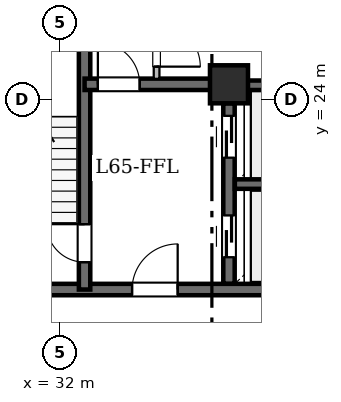
"""IFC4 building model, lengths in metres.
Left out: names, types, materials, properties, quantities, classifications, styles, units other than length and angle.
Written with IfcOpenShell. Run it as: python <this file> out.ifc"""

import sys

from ifc_helpers import new_model, si_unit, direction, frame, frame_2d, origin, origin_2d, place, context, subcontext, project, spatial, rectangle, hollow_rectangle, extrude, element, fill, save


model = new_model("IFC4")
c1 = context("Model", 3, precision=1e-05, world=origin(), true_north=direction((0.0, 1.0)))
c2 = subcontext(c1, "Body", "Model", "MODEL_VIEW")
j1 = project(units=[si_unit("LENGTHUNIT", "METRE"), si_unit("PLANEANGLEUNIT", "RADIAN")], contexts=[c1])
p1 = place(None, origin())
s1 = spatial("IfcSite", under=j1, at=p1, CompositionType="ELEMENT")
p2 = place(p1, origin())
s2 = spatial("IfcBuilding", under=s1, at=p2, CompositionType="ELEMENT")
p3 = place(p2, frame((0.0, 0.0, 253.7)))
s3 = spatial("IfcBuildingStorey", under=s2, at=p3, CompositionType="ELEMENT", Elevation=253.7)
p4 = place(p3, frame((36.45, 24.4, 0.0), z_axis=(0.0, 0.0, 1.0), x_axis=(1.0, 0.0, 0.0)))
e1 = element("IfcColumn", 1, at=p4, inside=s3, PredefinedType="COLUMN", context=c2, shape_type="SweptSolid", body=[
    extrude(hollow_rectangle(XDim=1.0, YDim=1.0, WallThickness=0.05, at=origin_2d()), origin(), (0.0, 0.0, 1.0), 3.65),
])
p5 = place(p3, frame((29.0, 19.0, 0.0), z_axis=(0.0, 0.0, 1.0), x_axis=(1.0, 0.0, 0.0)))
e2 = element("IfcWall", 2, at=p5, inside=s3, PredefinedType="SHEAR", context=c2, shape_type="SweptSolid", body=[
    extrude(rectangle(XDim=10.4, YDim=0.3, at=frame_2d((5.2, 0.0))), origin(), (0.0, 0.0, 1.0), 3.43),
])
p6 = place(p5, frame((4.9, 0.0, 0.0)))
e3 = element("IfcOpeningElement", 3, at=p6, cuts=e2, PredefinedType="OPENING", context=c2, shape_type="SweptSolid", body=[
    extrude(rectangle(XDim=1.2, YDim=2.15, at=frame_2d((0.6, 1.075))), frame((0.0, 0.16, 0.0), z_axis=(0.0, -1.0, 0.0), x_axis=(1.0, 0.0, 0.0)), (0.0, 0.0, 1.0), 0.32),
])
p7 = place(p3, frame((32.65, 19.0, 0.0), z_axis=(0.0, 0.0, 1.0), x_axis=(0.0, 1.0, 0.0)))
e4 = element("IfcWall", 4, at=p7, inside=s3, PredefinedType="SHEAR", context=c2, shape_type="SweptSolid", body=[
    extrude(rectangle(XDim=9.0, YDim=0.3, at=frame_2d((4.5, 0.0))), origin(), (0.0, 0.0, 1.0), 3.43),
])
p8 = place(p7, frame((0.72, 0.0, 0.0)))
e5 = element("IfcOpeningElement", 5, at=p8, cuts=e4, PredefinedType="OPENING", context=c2, shape_type="SweptSolid", body=[
    extrude(rectangle(XDim=1.0, YDim=2.15, at=frame_2d((0.5, 1.075))), frame((0.0, 0.16, 0.0), z_axis=(0.0, -1.0, 0.0), x_axis=(1.0, 0.0, 0.0)), (0.0, 0.0, 1.0), 0.32),
])
p9 = place(p3, frame((32.65, 24.4, 0.0), z_axis=(0.0, 0.0, 1.0), x_axis=(1.0, 0.0, 0.0)))
e6 = element("IfcWall", 6, at=p9, inside=s3, PredefinedType="SHEAR", context=c2, shape_type="SweptSolid", body=[
    extrude(rectangle(XDim=3.8, YDim=0.3, at=frame_2d((1.9, 0.0))), origin(), (0.0, 0.0, 1.0), 3.43),
])
p10 = place(p9, frame((0.35, 0.0, 0.0)))
e7 = element("IfcOpeningElement", 7, at=p10, cuts=e6, PredefinedType="OPENING", context=c2, shape_type="SweptSolid", body=[
    extrude(rectangle(XDim=1.1, YDim=2.15, at=frame_2d((0.55, 1.075))), frame((0.0, 0.16, 0.0), z_axis=(0.0, -1.0, 0.0), x_axis=(1.0, 0.0, 0.0)), (0.0, 0.0, 1.0), 0.32),
])
p11 = place(p3, frame((36.45, 19.154, 0.0), z_axis=(0.0, 0.0, 1.0), x_axis=(0.0, 1.0, 0.0)))
e8 = element("IfcWall", 8, at=p11, inside=s3, PredefinedType="SHEAR", context=c2, shape_type="SweptSolid", body=[
    extrude(rectangle(XDim=4.746, YDim=0.3, at=frame_2d((2.373, 0.0))), origin(), (0.0, 0.0, 1.0), 3.43),
])
p12 = place(p11, frame((0.696, 0.0, 0.0)))
e9 = element("IfcOpeningElement", 9, at=p12, cuts=e8, PredefinedType="OPENING", context=c2, shape_type="SweptSolid", body=[
    extrude(rectangle(XDim=1.1, YDim=2.15, at=frame_2d((0.55, 1.075))), frame((0.0, 0.16, 0.0), z_axis=(0.0, -1.0, 0.0), x_axis=(1.0, 0.0, 0.0)), (0.0, 0.0, 1.0), 0.32),
])
p13 = place(p11, frame((3.316, 0.0, 0.0)))
e10 = element("IfcOpeningElement", 10, at=p13, cuts=e8, PredefinedType="OPENING", context=c2, shape_type="SweptSolid", body=[
    extrude(rectangle(XDim=1.1, YDim=2.15, at=frame_2d((0.55, 1.075))), frame((0.0, 0.16, 0.0), z_axis=(0.0, -1.0, 0.0), x_axis=(1.0, 0.0, 0.0)), (0.0, 0.0, 1.0), 0.32),
])
for number, where, z_axis, x_axis in (
    (11, (36.604, 21.775, 0.0), (0.0, 0.0, 1.0), (1.0, 0.0, 0.0)),
    (12, (36.604, 24.375, 0.0), (0.0, 0.0, 1.0), (1.0, 0.0, 0.0)),
):
    element("IfcWall", number, at=place(p3, frame(where, z_axis=z_axis, x_axis=x_axis)), inside=s3, PredefinedType="SHEAR", context=c2, shape_type="SweptSolid", body=[
        extrude(rectangle(XDim=2.642, YDim=0.25, at=frame_2d((1.321, 0.0))), origin(), (0.0, 0.0, 1.0), 3.43),
    ])
p14 = place(p3, frame((34.545, 26.336, 0.0), z_axis=(0.0, 0.0, 1.0), x_axis=(0.0, -1.0, 0.0)))
e13 = element("IfcWall", 13, at=p14, inside=s3, PredefinedType="STANDARD", context=c2, shape_type="SweptSolid", body=[
    extrude(rectangle(XDim=1.792, YDim=0.15, at=frame_2d((0.896, 0.0))), origin(), (0.0, 0.0, 1.0), 3.43),
])
p15 = place(p14, frame((0.321, 0.0, 0.0)))
e14 = element("IfcOpeningElement", 14, at=p15, cuts=e13, PredefinedType="OPENING", context=c2, shape_type="SweptSolid", body=[
    extrude(rectangle(XDim=1.15, YDim=2.2, at=frame_2d((0.575, 1.1))), frame((0.0, 0.085, 0.0), z_axis=(0.0, -1.0, 0.0), x_axis=(1.0, 0.0, 0.0)), (0.0, 0.0, 1.0), 0.17),
])
p16 = place(p8, origin())
e15 = element("IfcDoor", 15, at=p16, inside=s3, OperationType="SINGLE_SWING_RIGHT", PredefinedType="DOOR", context=c2, shape_type="SweptSolid", body=[
    extrude(rectangle(XDim=1.0, YDim=2.15, at=frame_2d((0.5, 1.075))), frame((0.0, 0.025, 0.0), z_axis=(0.0, -1.0, 0.0), x_axis=(1.0, 0.0, 0.0)), (0.0, 0.0, 1.0), 0.05),
])
fill(e5, e15)
p17 = place(p10, origin())
e16 = element("IfcDoor", 16, at=p17, inside=s3, OperationType="SINGLE_SWING_LEFT", PredefinedType="DOOR", context=c2, shape_type="SweptSolid", body=[
    extrude(rectangle(XDim=1.1, YDim=2.15, at=frame_2d((0.55, 1.075))), frame((0.0, 0.025, 0.0), z_axis=(0.0, -1.0, 0.0), x_axis=(1.0, 0.0, 0.0)), (0.0, 0.0, 1.0), 0.05),
])
fill(e7, e16)
p18 = place(p6, origin())
e17 = element("IfcDoor", 17, at=p18, inside=s3, OperationType="SINGLE_SWING_RIGHT", PredefinedType="DOOR", context=c2, shape_type="SweptSolid", body=[
    extrude(rectangle(XDim=1.2, YDim=2.15, at=frame_2d((0.6, 1.075))), frame((0.0, 0.025, 0.0), z_axis=(0.0, -1.0, 0.0), x_axis=(1.0, 0.0, 0.0)), (0.0, 0.0, 1.0), 0.05),
])
fill(e3, e17)
p19 = place(p12, origin())
e18 = element("IfcDoor", 18, at=p19, inside=s3, OperationType="SLIDING_TO_LEFT", PredefinedType="DOOR", context=c2, shape_type="SweptSolid", body=[
    extrude(rectangle(XDim=1.1, YDim=2.15, at=frame_2d((0.55, 1.075))), frame((0.0, 0.025, 0.0), z_axis=(0.0, -1.0, 0.0), x_axis=(1.0, 0.0, 0.0)), (0.0, 0.0, 1.0), 0.05),
])
fill(e9, e18)
p20 = place(p13, origin())
e19 = element("IfcDoor", 19, at=p20, inside=s3, OperationType="SLIDING_TO_LEFT", PredefinedType="DOOR", context=c2, shape_type="SweptSolid", body=[
    extrude(rectangle(XDim=1.1, YDim=2.15, at=frame_2d((0.55, 1.075))), frame((0.0, 0.025, 0.0), z_axis=(0.0, -1.0, 0.0), x_axis=(1.0, 0.0, 0.0)), (0.0, 0.0, 1.0), 0.05),
])
fill(e10, e19)
p21 = place(p15, origin())
e20 = element("IfcDoor", 20, at=p21, inside=s3, OperationType="SINGLE_SWING_RIGHT", PredefinedType="DOOR", context=c2, shape_type="SweptSolid", body=[
    extrude(rectangle(XDim=1.15, YDim=2.2, at=frame_2d((0.575, 1.1))), frame((0.0, 0.025, 0.0), z_axis=(0.0, -1.0, 0.0), x_axis=(1.0, 0.0, 0.0)), (0.0, 0.0, 1.0), 0.05),
])
fill(e14, e20)
save(model, sys.argv[1])
